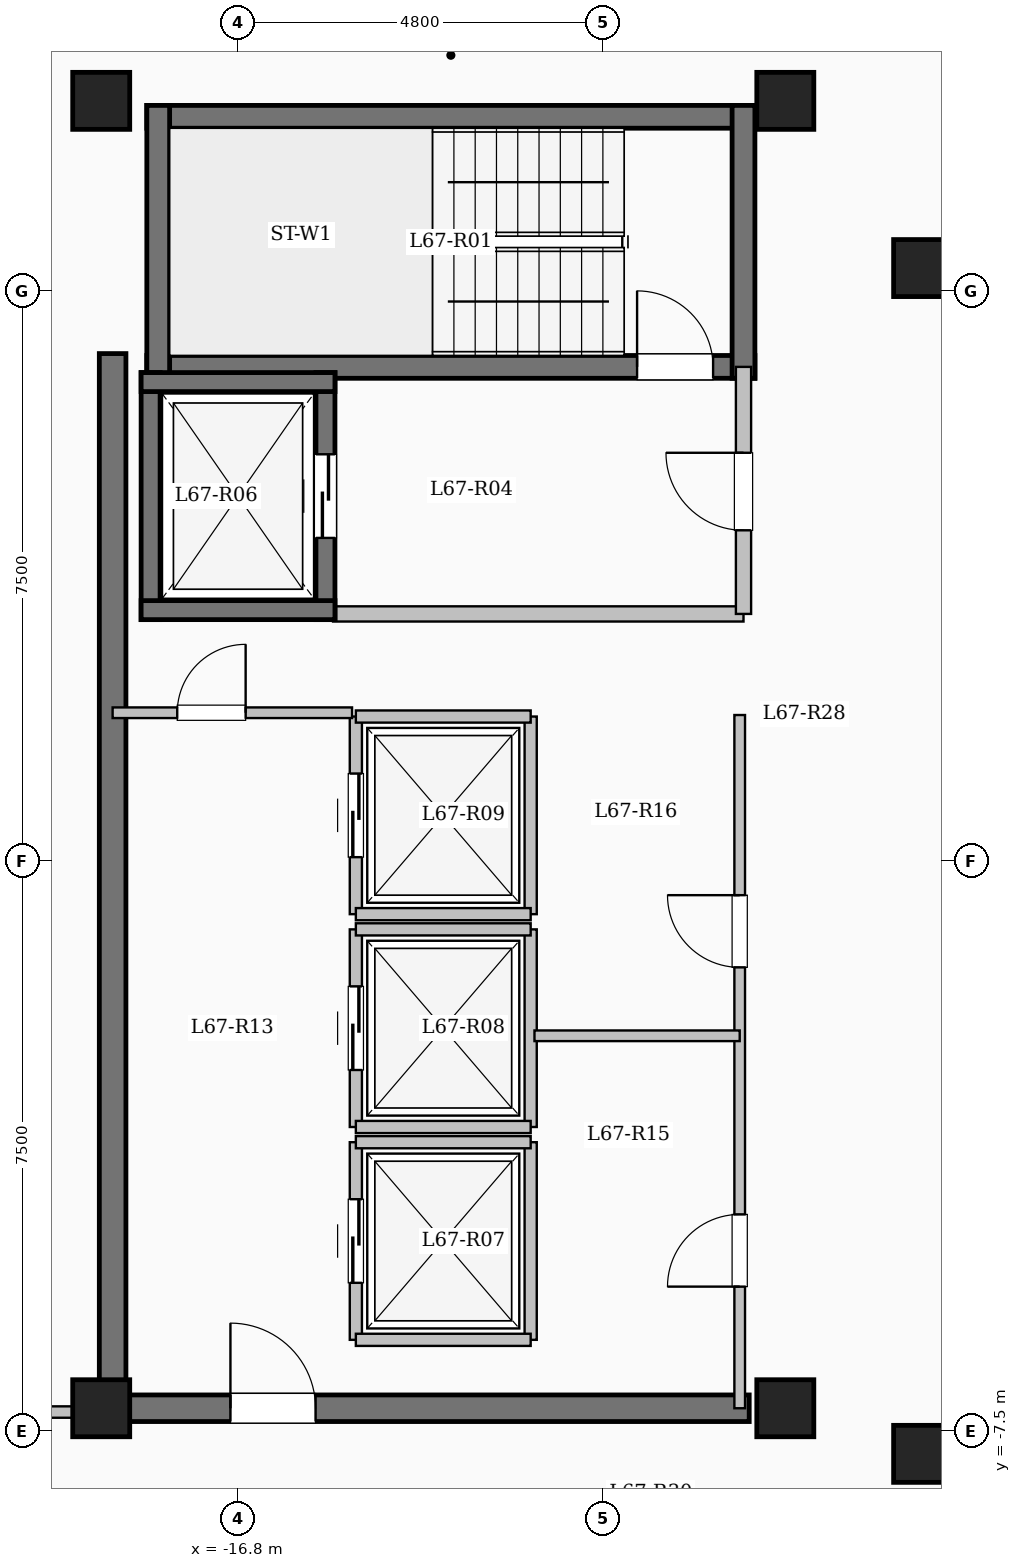
"""IFC4 building model, lengths in metres.
Left out: names, types, materials, properties, quantities, classifications, styles, units other than length and angle.
Written with IfcOpenShell. Run it as: python <this file> out.ifc"""

import sys

from ifc_helpers import new_model, si_unit, direction, frame, frame_2d, origin, origin_2d, place, context, subcontext, project, spatial, rectangle, extrude, element, fill, save


model = new_model("IFC4")
c1 = context("Model", 3, precision=1e-05, world=origin(), true_north=direction((0.0, 1.0)))
c2 = subcontext(c1, "Body", "Model", "MODEL_VIEW")
j1 = project(units=[si_unit("LENGTHUNIT", "METRE"), si_unit("PLANEANGLEUNIT", "RADIAN")], contexts=[c1])
p1 = place(None, origin())
s1 = spatial("IfcSite", under=j1, at=p1, CompositionType="ELEMENT")
p2 = place(p1, origin())
s2 = spatial("IfcBuilding", under=s1, at=p2, CompositionType="ELEMENT")
p3 = place(p2, frame((0.0, 0.0, 248.2)))
s3 = spatial("IfcBuildingStorey", under=s2, at=p3, CompositionType="ELEMENT", Elevation=248.2)
for number, where, z_axis, x_axis in (
    (1, (-7.8, -7.8, 0.0), (0.0, 0.0, 1.0), (1.0, 0.0, 0.0)),
    (2, (-7.8, 7.8, 0.0), (0.0, 0.0, 1.0), (1.0, 0.0, 0.0)),
    (3, (-9.6, -7.2, 0.0), (0.0, 0.0, 1.0), (1.0, 0.0, 0.0)),
    (4, (-9.6, 10.0, 0.0), (0.0, 0.0, 1.0), (1.0, 0.0, 0.0)),
    (5, (-18.6, -7.2, 0.0), (0.0, 0.0, 1.0), (1.0, 0.0, 0.0)),
    (6, (-18.6, 10.0, 0.0), (0.0, 0.0, 1.0), (1.0, 0.0, 0.0)),
):
    element("IfcColumn", number, at=place(p3, frame(where, z_axis=z_axis, x_axis=x_axis)), inside=s3, PredefinedType="COLUMN", context=c2, shape_type="SweptSolid", body=[
        extrude(rectangle(XDim=0.75, YDim=0.75, at=origin_2d()), origin(), (0.0, 0.0, 1.0), 3.35),
    ])
p4 = place(p3, frame((-18.0, 9.79, 0.0), z_axis=(0.0, 0.0, 1.0), x_axis=(1.0, 0.0, 0.0)))
e7 = element("IfcWall", 7, at=p4, inside=s3, PredefinedType="SHEAR", context=c2, shape_type="SweptSolid", body=[
    extrude(rectangle(XDim=8.0, YDim=0.3, at=frame_2d((4.0, 0.0))), origin(), (0.0, 0.0, 1.0), 3.35),
])
p5 = place(p3, frame((-18.0, 6.5, 0.0), z_axis=(0.0, 0.0, 1.0), x_axis=(1.0, 0.0, 0.0)))
e8 = element("IfcWall", 8, at=p5, inside=s3, PredefinedType="SHEAR", context=c2, shape_type="SweptSolid", body=[
    extrude(rectangle(XDim=8.0, YDim=0.3, at=frame_2d((4.0, 0.0))), origin(), (0.0, 0.0, 1.0), 3.35),
])
p6 = place(p5, frame((6.45, 0.0, 0.0)))
e9 = element("IfcOpeningElement", 9, at=p6, cuts=e8, PredefinedType="OPENING", context=c2, shape_type="SweptSolid", body=[
    extrude(rectangle(XDim=1.0, YDim=2.15, at=frame_2d((0.5, 1.075))), frame((0.0, 0.16, 0.0), z_axis=(0.0, -1.0, 0.0), x_axis=(1.0, 0.0, 0.0)), (0.0, 0.0, 1.0), 0.32),
])
for number, where, z_axis, x_axis in (
    (10, (-17.85, 6.35, 0.0), (0.0, 0.0, 1.0), (0.0, 1.0, 0.0)),
    (11, (-10.15, 6.35, 0.0), (0.0, 0.0, 1.0), (0.0, 1.0, 0.0)),
):
    element("IfcWall", number, at=place(p3, frame(where, z_axis=z_axis, x_axis=x_axis)), inside=s3, PredefinedType="SHEAR", context=c2, shape_type="SweptSolid", body=[
        extrude(rectangle(XDim=3.59, YDim=0.3, at=frame_2d((1.795, 0.0))), origin(), (0.0, 0.0, 1.0), 3.35),
    ])
p7 = place(p3, frame((-15.55, 3.25, 0.0), z_axis=(0.0, 0.0, 1.0), x_axis=(1.0, 0.0, 0.0)))
e12 = element("IfcWall", 12, at=p7, inside=s3, PredefinedType="SOLIDWALL", context=c2, shape_type="SweptSolid", body=[
    extrude(rectangle(XDim=5.4, YDim=0.2, at=frame_2d((2.7, 0.0))), origin(), (0.0, 0.0, 1.0), 3.1),
])
p8 = place(p3, frame((-10.15, 3.25, 0.0), z_axis=(0.0, 0.0, 1.0), x_axis=(0.0, 1.0, 0.0)))
e13 = element("IfcWall", 13, at=p8, inside=s3, PredefinedType="SOLIDWALL", context=c2, shape_type="SweptSolid", body=[
    extrude(rectangle(XDim=3.25, YDim=0.2, at=frame_2d((1.625, 0.0))), origin(), (0.0, 0.0, 1.0), 3.1),
])
p9 = place(p8, frame((1.1, 0.0, 0.0)))
e14 = element("IfcOpeningElement", 14, at=p9, cuts=e13, PredefinedType="OPENING", context=c2, shape_type="SweptSolid", body=[
    extrude(rectangle(XDim=1.02, YDim=2.15, at=frame_2d((0.51, 1.075))), frame((0.0, 0.11, 0.0), z_axis=(0.0, -1.0, 0.0), x_axis=(1.0, 0.0, 0.0)), (0.0, 0.0, 1.0), 0.22),
])
p10 = place(p3, frame((-17.95, 3.175, 0.0), z_axis=(0.0, 0.0, 1.0), x_axis=(0.0, 1.0, 0.0)))
e15 = element("IfcWall", 15, at=p10, inside=s3, PredefinedType="SHEAR", context=c2, shape_type="SweptSolid", body=[
    extrude(rectangle(XDim=3.25, YDim=0.25, at=frame_2d((1.625, 0.0))), origin(), (0.0, 0.0, 1.0), 3.35),
])
p11 = place(p3, frame((-15.65, 3.175, 0.0), z_axis=(0.0, 0.0, 1.0), x_axis=(0.0, 1.0, 0.0)))
e16 = element("IfcWall", 16, at=p11, inside=s3, PredefinedType="SHEAR", context=c2, shape_type="SweptSolid", body=[
    extrude(rectangle(XDim=3.25, YDim=0.25, at=frame_2d((1.625, 0.0))), origin(), (0.0, 0.0, 1.0), 3.35),
])
p12 = place(p11, frame((1.075, 0.0, 0.0)))
e17 = element("IfcOpeningElement", 17, at=p12, cuts=e16, PredefinedType="OPENING", context=c2, shape_type="SweptSolid", body=[
    extrude(rectangle(XDim=1.1, YDim=2.15, at=frame_2d((0.55, 1.075))), frame((0.0, 0.135, 0.0), z_axis=(0.0, -1.0, 0.0), x_axis=(1.0, 0.0, 0.0)), (0.0, 0.0, 1.0), 0.27),
])
for number, where, z_axis, x_axis in (
    (18, (-18.075, 3.3, 0.0), (0.0, 0.0, 1.0), (1.0, 0.0, 0.0)),
    (19, (-18.075, 6.3, 0.0), (0.0, 0.0, 1.0), (1.0, 0.0, 0.0)),
):
    element("IfcWall", number, at=place(p3, frame(where, z_axis=z_axis, x_axis=x_axis)), inside=s3, PredefinedType="SHEAR", context=c2, shape_type="SweptSolid", body=[
        extrude(rectangle(XDim=2.55, YDim=0.25, at=frame_2d((1.275, 0.0))), origin(), (0.0, 0.0, 1.0), 3.35),
    ])
p13 = place(p3, frame((-15.25, -6.3, 0.0), z_axis=(0.0, 0.0, 1.0), x_axis=(0.0, 1.0, 0.0)))
e20 = element("IfcWall", 20, at=p13, inside=s3, PredefinedType="SOLIDWALL", context=c2, shape_type="SweptSolid", body=[
    extrude(rectangle(XDim=2.6, YDim=0.16, at=frame_2d((1.3, 0.0))), origin(), (0.0, 0.0, 1.0), 3.1),
])
p14 = place(p13, frame((0.75, 0.0, 0.0)))
e21 = element("IfcOpeningElement", 21, at=p14, cuts=e20, PredefinedType="OPENING", context=c2, shape_type="SweptSolid", body=[
    extrude(rectangle(XDim=1.1, YDim=2.15, at=frame_2d((0.55, 1.075))), frame((0.0, 0.09, 0.0), z_axis=(0.0, -1.0, 0.0), x_axis=(1.0, 0.0, 0.0)), (0.0, 0.0, 1.0), 0.18),
])
p15 = place(p3, frame((-12.95, -6.3, 0.0), z_axis=(0.0, 0.0, 1.0), x_axis=(0.0, 1.0, 0.0)))
e22 = element("IfcWall", 22, at=p15, inside=s3, PredefinedType="SOLIDWALL", context=c2, shape_type="SweptSolid", body=[
    extrude(rectangle(XDim=2.6, YDim=0.16, at=frame_2d((1.3, 0.0))), origin(), (0.0, 0.0, 1.0), 3.1),
])
for number, where, z_axis, x_axis in (
    (23, (-15.25, -6.3, 0.0), (0.0, 0.0, 1.0), (1.0, 0.0, 0.0)),
    (24, (-15.25, -3.7, 0.0), (0.0, 0.0, 1.0), (1.0, 0.0, 0.0)),
):
    element("IfcWall", number, at=place(p3, frame(where, z_axis=z_axis, x_axis=x_axis)), inside=s3, PredefinedType="SOLIDWALL", context=c2, shape_type="SweptSolid", body=[
        extrude(rectangle(XDim=2.3, YDim=0.16, at=frame_2d((1.15, 0.0))), origin(), (0.0, 0.0, 1.0), 3.1),
    ])
p16 = place(p3, frame((-15.25, -3.5, 0.0), z_axis=(0.0, 0.0, 1.0), x_axis=(0.0, 1.0, 0.0)))
e25 = element("IfcWall", 25, at=p16, inside=s3, PredefinedType="SOLIDWALL", context=c2, shape_type="SweptSolid", body=[
    extrude(rectangle(XDim=2.6, YDim=0.16, at=frame_2d((1.3, 0.0))), origin(), (0.0, 0.0, 1.0), 3.1),
])
p17 = place(p16, frame((0.75, 0.0, 0.0)))
e26 = element("IfcOpeningElement", 26, at=p17, cuts=e25, PredefinedType="OPENING", context=c2, shape_type="SweptSolid", body=[
    extrude(rectangle(XDim=1.1, YDim=2.15, at=frame_2d((0.55, 1.075))), frame((0.0, 0.09, 0.0), z_axis=(0.0, -1.0, 0.0), x_axis=(1.0, 0.0, 0.0)), (0.0, 0.0, 1.0), 0.18),
])
p18 = place(p3, frame((-12.95, -3.5, 0.0), z_axis=(0.0, 0.0, 1.0), x_axis=(0.0, 1.0, 0.0)))
e27 = element("IfcWall", 27, at=p18, inside=s3, PredefinedType="SOLIDWALL", context=c2, shape_type="SweptSolid", body=[
    extrude(rectangle(XDim=2.6, YDim=0.16, at=frame_2d((1.3, 0.0))), origin(), (0.0, 0.0, 1.0), 3.1),
])
for number, where, z_axis, x_axis in (
    (28, (-15.25, -3.5, 0.0), (0.0, 0.0, 1.0), (1.0, 0.0, 0.0)),
    (29, (-15.25, -0.9, 0.0), (0.0, 0.0, 1.0), (1.0, 0.0, 0.0)),
):
    element("IfcWall", number, at=place(p3, frame(where, z_axis=z_axis, x_axis=x_axis)), inside=s3, PredefinedType="SOLIDWALL", context=c2, shape_type="SweptSolid", body=[
        extrude(rectangle(XDim=2.3, YDim=0.16, at=frame_2d((1.15, 0.0))), origin(), (0.0, 0.0, 1.0), 3.1),
    ])
p19 = place(p3, frame((-15.25, -0.7, 0.0), z_axis=(0.0, 0.0, 1.0), x_axis=(0.0, 1.0, 0.0)))
e30 = element("IfcWall", 30, at=p19, inside=s3, PredefinedType="SOLIDWALL", context=c2, shape_type="SweptSolid", body=[
    extrude(rectangle(XDim=2.6, YDim=0.16, at=frame_2d((1.3, 0.0))), origin(), (0.0, 0.0, 1.0), 3.1),
])
p20 = place(p19, frame((0.75, 0.0, 0.0)))
e31 = element("IfcOpeningElement", 31, at=p20, cuts=e30, PredefinedType="OPENING", context=c2, shape_type="SweptSolid", body=[
    extrude(rectangle(XDim=1.1, YDim=2.15, at=frame_2d((0.55, 1.075))), frame((0.0, 0.09, 0.0), z_axis=(0.0, -1.0, 0.0), x_axis=(1.0, 0.0, 0.0)), (0.0, 0.0, 1.0), 0.18),
])
p21 = place(p3, frame((-12.95, -0.7, 0.0), z_axis=(0.0, 0.0, 1.0), x_axis=(0.0, 1.0, 0.0)))
e32 = element("IfcWall", 32, at=p21, inside=s3, PredefinedType="SOLIDWALL", context=c2, shape_type="SweptSolid", body=[
    extrude(rectangle(XDim=2.6, YDim=0.16, at=frame_2d((1.3, 0.0))), origin(), (0.0, 0.0, 1.0), 3.1),
])
for number, where, z_axis, x_axis in (
    (33, (-15.25, -0.7, 0.0), (0.0, 0.0, 1.0), (1.0, 0.0, 0.0)),
    (34, (-15.25, 1.9, 0.0), (0.0, 0.0, 1.0), (1.0, 0.0, 0.0)),
):
    element("IfcWall", number, at=place(p3, frame(where, z_axis=z_axis, x_axis=x_axis)), inside=s3, PredefinedType="SOLIDWALL", context=c2, shape_type="SweptSolid", body=[
        extrude(rectangle(XDim=2.3, YDim=0.16, at=frame_2d((1.15, 0.0))), origin(), (0.0, 0.0, 1.0), 3.1),
    ])
p22 = place(p3, frame((-18.45, -7.375, 0.0), z_axis=(0.0, 0.0, 1.0), x_axis=(0.0, 1.0, 0.0)))
e35 = element("IfcWall", 35, at=p22, inside=s3, PredefinedType="SHEAR", context=c2, shape_type="SweptSolid", body=[
    extrude(rectangle(XDim=14.05, YDim=0.35, at=frame_2d((7.025, 0.0))), origin(), (0.0, 0.0, 1.0), 3.35),
])
p23 = place(p3, frame((-18.625, -7.2, 0.0), z_axis=(0.0, 0.0, 1.0), x_axis=(1.0, 0.0, 0.0)))
e36 = element("IfcWall", 36, at=p23, inside=s3, PredefinedType="SHEAR", context=c2, shape_type="SweptSolid", body=[
    extrude(rectangle(XDim=8.55, YDim=0.35, at=frame_2d((4.275, 0.0))), origin(), (0.0, 0.0, 1.0), 3.35),
])
p24 = place(p23, frame((1.725, 0.0, 0.0)))
e37 = element("IfcOpeningElement", 37, at=p24, cuts=e36, PredefinedType="OPENING", context=c2, shape_type="SweptSolid", body=[
    extrude(rectangle(XDim=1.12, YDim=2.15, at=frame_2d((0.56, 1.075))), frame((0.0, 0.185, 0.0), z_axis=(0.0, -1.0, 0.0), x_axis=(1.0, 0.0, 0.0)), (0.0, 0.0, 1.0), 0.37),
])
p25 = place(p3, frame((-18.45, 1.95, 0.0), z_axis=(0.0, 0.0, 1.0), x_axis=(1.0, 0.0, 0.0)))
e38 = element("IfcWall", 38, at=p25, inside=s3, PredefinedType="PARTITIONING", context=c2, shape_type="SweptSolid", body=[
    extrude(rectangle(XDim=3.15, YDim=0.14, at=frame_2d((1.575, 0.0))), origin(), (0.0, 0.0, 1.0), 3.1),
])
p26 = place(p25, frame((0.85, 0.0, 0.0)))
e39 = element("IfcOpeningElement", 39, at=p26, cuts=e38, PredefinedType="OPENING", context=c2, shape_type="SweptSolid", body=[
    extrude(rectangle(XDim=0.9, YDim=2.08, at=frame_2d((0.45, 1.04))), frame((0.0, 0.08, 0.0), z_axis=(0.0, -1.0, 0.0), x_axis=(1.0, 0.0, 0.0)), (0.0, 0.0, 1.0), 0.16),
])
p27 = place(p3, frame((-10.2, -7.2, 0.0), z_axis=(0.0, 0.0, 1.0), x_axis=(0.0, 1.0, 0.0)))
e40 = element("IfcWall", 40, at=p27, inside=s3, PredefinedType="PARTITIONING", context=c2, shape_type="SweptSolid", body=[
    extrude(rectangle(XDim=9.12, YDim=0.14, at=frame_2d((4.56, 0.0))), origin(), (0.0, 0.0, 1.0), 3.1),
])
p28 = place(p27, frame((1.6, 0.0, 0.0)))
e41 = element("IfcOpeningElement", 41, at=p28, cuts=e40, PredefinedType="OPENING", context=c2, shape_type="SweptSolid", body=[
    extrude(rectangle(XDim=0.95, YDim=2.12, at=frame_2d((0.475, 1.06))), frame((0.0, 0.08, 0.0), z_axis=(0.0, -1.0, 0.0), x_axis=(1.0, 0.0, 0.0)), (0.0, 0.0, 1.0), 0.16),
])
p29 = place(p27, frame((5.8, 0.0, 0.0)))
e42 = element("IfcOpeningElement", 42, at=p29, cuts=e40, PredefinedType="OPENING", context=c2, shape_type="SweptSolid", body=[
    extrude(rectangle(XDim=0.95, YDim=2.12, at=frame_2d((0.475, 1.06))), frame((0.0, 0.08, 0.0), z_axis=(0.0, -1.0, 0.0), x_axis=(1.0, 0.0, 0.0)), (0.0, 0.0, 1.0), 0.16),
])
p30 = place(p3, frame((-12.9, -2.3, 0.0), z_axis=(0.0, 0.0, 1.0), x_axis=(1.0, 0.0, 0.0)))
e43 = element("IfcWall", 43, at=p30, inside=s3, PredefinedType="PARTITIONING", context=c2, shape_type="SweptSolid", body=[
    extrude(rectangle(XDim=2.7, YDim=0.14, at=frame_2d((1.35, 0.0))), origin(), (0.0, 0.0, 1.0), 3.1),
])
p31 = place(p3, frame((-22.68, -7.25, 0.0), z_axis=(0.0, 0.0, 1.0), x_axis=(1.0, 0.0, 0.0)))
e44 = element("IfcWall", 44, at=p31, inside=s3, PredefinedType="PARTITIONING", context=c2, shape_type="SweptSolid", body=[
    extrude(rectangle(XDim=4.23, YDim=0.15, at=frame_2d((2.115, 0.0))), origin(), (0.0, 0.0, 1.0), 3.1),
])
p32 = place(p31, frame((1.63, 0.0, 0.0)))
e45 = element("IfcOpeningElement", 45, at=p32, cuts=e44, PredefinedType="OPENING", context=c2, shape_type="SweptSolid", body=[
    extrude(rectangle(XDim=1.08, YDim=2.15, at=frame_2d((0.54, 1.075))), frame((0.0, 0.085, 0.0), z_axis=(0.0, -1.0, 0.0), x_axis=(1.0, 0.0, 0.0)), (0.0, 0.0, 1.0), 0.17),
])
p33 = place(p6, origin())
e46 = element("IfcDoor", 46, at=p33, inside=s3, OperationType="SINGLE_SWING_LEFT", PredefinedType="DOOR", context=c2, shape_type="SweptSolid", body=[
    extrude(rectangle(XDim=1.0, YDim=2.15, at=frame_2d((0.5, 1.075))), frame((0.0, 0.025, 0.0), z_axis=(0.0, -1.0, 0.0), x_axis=(1.0, 0.0, 0.0)), (0.0, 0.0, 1.0), 0.05),
])
fill(e9, e46)
p34 = place(p9, origin())
e47 = element("IfcDoor", 47, at=p34, inside=s3, OperationType="SINGLE_SWING_RIGHT", PredefinedType="DOOR", context=c2, shape_type="SweptSolid", body=[
    extrude(rectangle(XDim=1.02, YDim=2.15, at=frame_2d((0.51, 1.075))), frame((0.0, 0.025, 0.0), z_axis=(0.0, -1.0, 0.0), x_axis=(1.0, 0.0, 0.0)), (0.0, 0.0, 1.0), 0.05),
])
fill(e14, e47)
p35 = place(p12, origin())
e48 = element("IfcDoor", 48, at=p35, inside=s3, OperationType="SLIDING_TO_LEFT", PredefinedType="DOOR", context=c2, shape_type="SweptSolid", body=[
    extrude(rectangle(XDim=1.1, YDim=2.15, at=frame_2d((0.55, 1.075))), frame((0.0, 0.025, 0.0), z_axis=(0.0, -1.0, 0.0), x_axis=(1.0, 0.0, 0.0)), (0.0, 0.0, 1.0), 0.05),
])
fill(e17, e48)
p36 = place(p14, origin())
e49 = element("IfcDoor", 49, at=p36, inside=s3, OperationType="SLIDING_TO_LEFT", PredefinedType="DOOR", context=c2, shape_type="SweptSolid", body=[
    extrude(rectangle(XDim=1.1, YDim=2.15, at=frame_2d((0.55, 1.075))), frame((0.0, 0.025, 0.0), z_axis=(0.0, -1.0, 0.0), x_axis=(1.0, 0.0, 0.0)), (0.0, 0.0, 1.0), 0.05),
])
fill(e21, e49)
p37 = place(p17, origin())
e50 = element("IfcDoor", 50, at=p37, inside=s3, OperationType="SLIDING_TO_LEFT", PredefinedType="DOOR", context=c2, shape_type="SweptSolid", body=[
    extrude(rectangle(XDim=1.1, YDim=2.15, at=frame_2d((0.55, 1.075))), frame((0.0, 0.025, 0.0), z_axis=(0.0, -1.0, 0.0), x_axis=(1.0, 0.0, 0.0)), (0.0, 0.0, 1.0), 0.05),
])
fill(e26, e50)
p38 = place(p20, origin())
e51 = element("IfcDoor", 51, at=p38, inside=s3, OperationType="SLIDING_TO_LEFT", PredefinedType="DOOR", context=c2, shape_type="SweptSolid", body=[
    extrude(rectangle(XDim=1.1, YDim=2.15, at=frame_2d((0.55, 1.075))), frame((0.0, 0.025, 0.0), z_axis=(0.0, -1.0, 0.0), x_axis=(1.0, 0.0, 0.0)), (0.0, 0.0, 1.0), 0.05),
])
fill(e31, e51)
p39 = place(p24, origin())
e52 = element("IfcDoor", 52, at=p39, inside=s3, OperationType="SINGLE_SWING_LEFT", PredefinedType="DOOR", context=c2, shape_type="SweptSolid", body=[
    extrude(rectangle(XDim=1.12, YDim=2.15, at=frame_2d((0.56, 1.075))), frame((0.0, 0.025, 0.0), z_axis=(0.0, -1.0, 0.0), x_axis=(1.0, 0.0, 0.0)), (0.0, 0.0, 1.0), 0.05),
])
fill(e37, e52)
p40 = place(p26, origin())
e53 = element("IfcDoor", 53, at=p40, inside=s3, OperationType="SINGLE_SWING_RIGHT", PredefinedType="DOOR", context=c2, shape_type="SweptSolid", body=[
    extrude(rectangle(XDim=0.9, YDim=2.08, at=frame_2d((0.45, 1.04))), frame((0.0, 0.025, 0.0), z_axis=(0.0, -1.0, 0.0), x_axis=(1.0, 0.0, 0.0)), (0.0, 0.0, 1.0), 0.05),
])
fill(e39, e53)
p41 = place(p28, origin())
e54 = element("IfcDoor", 54, at=p41, inside=s3, OperationType="SINGLE_SWING_LEFT", PredefinedType="DOOR", context=c2, shape_type="SweptSolid", body=[
    extrude(rectangle(XDim=0.95, YDim=2.12, at=frame_2d((0.475, 1.06))), frame((0.0, 0.025, 0.0), z_axis=(0.0, -1.0, 0.0), x_axis=(1.0, 0.0, 0.0)), (0.0, 0.0, 1.0), 0.05),
])
fill(e41, e54)
p42 = place(p29, origin())
e55 = element("IfcDoor", 55, at=p42, inside=s3, OperationType="SINGLE_SWING_RIGHT", PredefinedType="DOOR", context=c2, shape_type="SweptSolid", body=[
    extrude(rectangle(XDim=0.95, YDim=2.12, at=frame_2d((0.475, 1.06))), frame((0.0, 0.025, 0.0), z_axis=(0.0, -1.0, 0.0), x_axis=(1.0, 0.0, 0.0)), (0.0, 0.0, 1.0), 0.05),
])
fill(e42, e55)
save(model, sys.argv[1])
